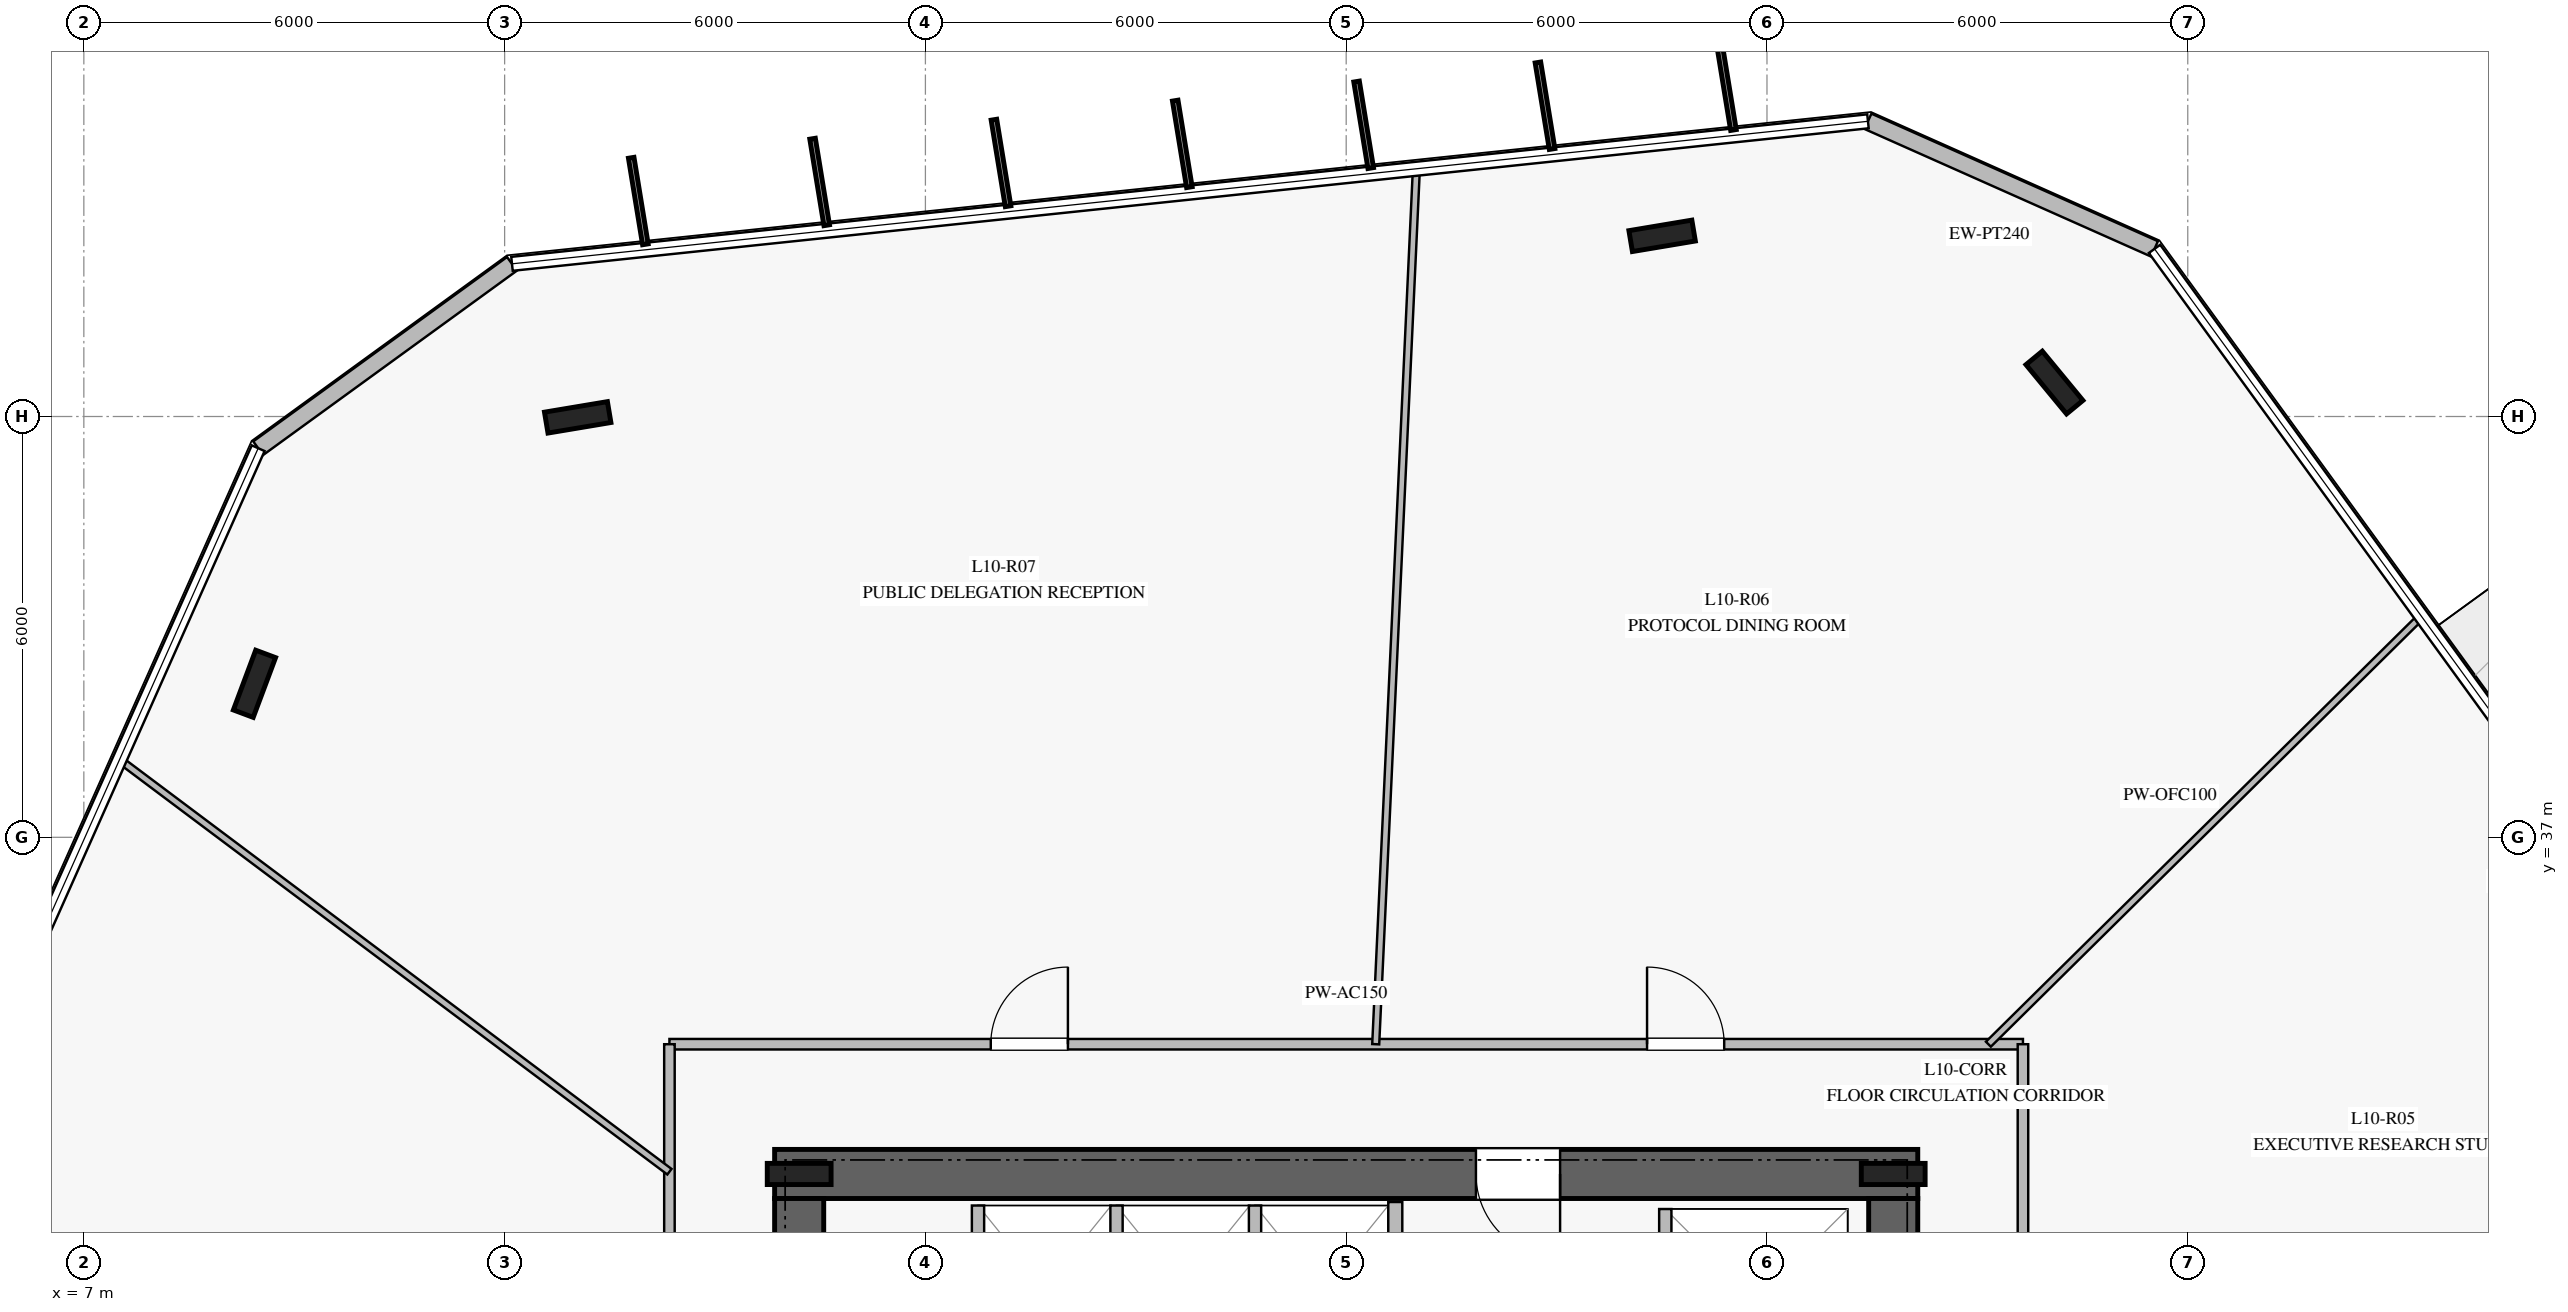
"""IFC4 building model, lengths in metres.
Left out: names, types, materials, properties, quantities, classifications, styles, units other than length and angle.
Written with IfcOpenShell. Run it as: python <this file> out.ifc"""

import sys

from ifc_helpers import new_model, si_unit, direction, frame, frame_2d, origin, origin_2d, place, context, subcontext, project, spatial, rectangle, i_section, extrude, element, fill, save


model = new_model("IFC4")
c1 = context("Model", 3, precision=1e-05, world=origin(), true_north=direction((0.0, 1.0)))
c2 = subcontext(c1, "Body", "Model", "MODEL_VIEW")
j1 = project(units=[si_unit("LENGTHUNIT", "METRE"), si_unit("PLANEANGLEUNIT", "RADIAN")], contexts=[c1])
p1 = place(None, origin())
s1 = spatial("IfcSite", under=j1, at=p1, CompositionType="ELEMENT")
p2 = place(p1, origin())
s2 = spatial("IfcBuilding", under=s1, at=p2, CompositionType="ELEMENT")
p3 = place(p2, frame((0.0, 0.0, 44.0)))
s3 = spatial("IfcBuildingStorey", under=s2, at=p3, CompositionType="ELEMENT", Elevation=44.0)
p4 = place(p3, frame((33.15, 32.2, 0.0), z_axis=(0.0, 0.0, 1.0), x_axis=(-1.0, 0.0, 0.0)))
e1 = element("IfcWall", 1, at=p4, inside=s3, PredefinedType="SHEAR", context=c2, shape_type="SweptSolid", body=[
    extrude(rectangle(XDim=16.3, YDim=0.7, at=frame_2d((8.15, 0.0))), origin(), (0.0, 0.0, 1.0), 3.76),
])
p5 = place(p4, frame((5.1, 0.0, 0.0)))
e2 = element("IfcOpeningElement", 2, at=p5, cuts=e1, PredefinedType="OPENING", context=c2, shape_type="SweptSolid", body=[
    extrude(rectangle(XDim=1.2, YDim=2.25, at=frame_2d((0.6, 1.125))), frame((0.0, 0.36, 0.0), z_axis=(0.0, -1.0, 0.0), x_axis=(1.0, 0.0, 0.0)), (0.0, 0.0, 1.0), 0.72),
])
p6 = place(p3, frame((17.2, 31.85, 0.0), z_axis=(0.0, 0.0, 1.0), x_axis=(0.0, -1.0, 0.0)))
e3 = element("IfcWall", 3, at=p6, inside=s3, PredefinedType="SHEAR", context=c2, shape_type="SweptSolid", body=[
    extrude(rectangle(XDim=13.7, YDim=0.7, at=frame_2d((6.85, 0.0))), origin(), (0.0, 0.0, 1.0), 3.76),
])
p7 = place(p6, frame((2.0, 0.0, 0.0)))
e4 = element("IfcOpeningElement", 4, at=p7, cuts=e3, PredefinedType="OPENING", context=c2, shape_type="SweptSolid", body=[
    extrude(rectangle(XDim=1.5, YDim=2.2, at=frame_2d((0.75, 1.1))), frame((0.0, 0.36, 0.0), z_axis=(0.0, -1.0, 0.0), x_axis=(1.0, 0.0, 0.0)), (0.0, 0.0, 1.0), 0.72),
])
p8 = place(p3, frame((32.8, 18.15, 0.0), z_axis=(0.0, 0.0, 1.0), x_axis=(0.0, 1.0, 0.0)))
e5 = element("IfcWall", 5, at=p8, inside=s3, PredefinedType="SHEAR", context=c2, shape_type="SweptSolid", body=[
    extrude(rectangle(XDim=13.7, YDim=0.7, at=frame_2d((6.85, 0.0))), origin(), (0.0, 0.0, 1.0), 3.76),
])
for number, where, z_axis, x_axis in (
    (6, (32.8, 32.2, 0.0), (0.0, 0.0, 1.0), (1.0, 0.0, 0.0)),
    (7, (17.2, 32.2, 0.0), (0.0, 0.0, 1.0), (1.0, 0.0, 0.0)),
    (8, (35.099, 43.484, 0.0), (0.0, 0.0, 1.0), (-0.636, 0.772, 0.0)),
    (9, (29.505, 45.576, 0.0), (0.0, 0.0, 1.0), (0.986, 0.165, 0.0)),
    (10, (14.042, 42.988, 0.0), (0.0, 0.0, 1.0), (0.986, 0.165, 0.0)),
    (11, (9.433, 39.189, 0.0), (0.0, 0.0, 1.0), (0.35, 0.937, 0.0)),
):
    element("IfcColumn", number, at=place(p3, frame(where, z_axis=z_axis, x_axis=x_axis)), inside=s3, PredefinedType="COLUMN", context=c2, shape_type="SweptSolid", body=[
        extrude(i_section(OverallWidth=0.302, OverallDepth=0.91, WebThickness=0.021, FlangeThickness=0.04, at=origin_2d()), origin(), (0.0, 0.0, 1.0), 4.0),
    ])
p9 = place(p3, frame((36.526, 45.39, 0.0), z_axis=(0.0, 0.0, 1.0), x_axis=(-0.91355250122, 0.406720822573, 0.0)))
e12 = element("IfcWall", 12, at=p9, inside=s3, PredefinedType="STANDARD", context=c2, shape_type="SweptSolid", body=[
    extrude(rectangle(XDim=4.473, YDim=0.24, at=frame_2d((2.236, 0.0))), origin(), (0.0, 0.0, 1.0), 3.76),
])
p10 = place(p3, frame((13.105, 45.177, 0.0), z_axis=(0.0, 0.0, 1.0), x_axis=(-0.80905696026, -0.587730240038, 0.0)))
e13 = element("IfcWall", 13, at=p10, inside=s3, PredefinedType="STANDARD", context=c2, shape_type="SweptSolid", body=[
    extrude(rectangle(XDim=4.473, YDim=0.24, at=frame_2d((2.236, 0.0))), origin(), (0.0, 0.0, 1.0), 3.76),
])
p11 = place(p3, frame((25.7, 26.65, 0.0), z_axis=(0.0, 0.0, 1.0), x_axis=(0.0, 1.0, 0.0)))
e14 = element("IfcWall", 14, at=p11, inside=s3, PredefinedType="PARTITIONING", context=c2, shape_type="SweptSolid", body=[
    extrude(rectangle(XDim=5.15, YDim=0.2, at=frame_2d((2.575, 0.0))), origin(), (0.0, 0.0, 1.0), 3.76),
])
for number, where, z_axis, x_axis in (
    (15, (19.75, 29.4, 0.0), (0.0, 0.0, 1.0), (0.0, 1.0, 0.0)),
    (16, (21.725, 29.4, 0.0), (0.0, 0.0, 1.0), (0.0, 1.0, 0.0)),
    (17, (23.7, 29.4, 0.0), (0.0, 0.0, 1.0), (0.0, 1.0, 0.0)),
):
    element("IfcWall", number, at=place(p3, frame(where, z_axis=z_axis, x_axis=x_axis)), inside=s3, PredefinedType="PARTITIONING", context=c2, shape_type="SweptSolid", body=[
        extrude(rectangle(XDim=2.35, YDim=0.175, at=frame_2d((1.175, 0.0))), origin(), (0.0, 0.0, 1.0), 3.76),
    ])
p12 = place(p3, frame((29.55, 29.1, 0.0), z_axis=(0.0, 0.0, 1.0), x_axis=(0.0, 1.0, 0.0)))
e18 = element("IfcWall", 18, at=p12, inside=s3, PredefinedType="PARTITIONING", context=c2, shape_type="SweptSolid", body=[
    extrude(rectangle(XDim=2.6, YDim=0.175, at=frame_2d((1.3, 0.0))), origin(), (0.0, 0.0, 1.0), 3.76),
])
p13 = place(p12, frame((0.7, 0.0, 0.0)))
e19 = element("IfcOpeningElement", 19, at=p13, cuts=e18, PredefinedType="OPENING", context=c2, shape_type="SweptSolid", body=[
    extrude(rectangle(XDim=1.2, YDim=2.2, at=frame_2d((0.6, 1.1))), frame((0.0, 0.098, 0.0), z_axis=(0.0, -1.0, 0.0), x_axis=(1.0, 0.0, 0.0)), (0.0, 0.0, 1.0), 0.195),
])
p14 = place(p3, frame((15.35, 34.05, 0.0), z_axis=(0.0, 0.0, 1.0), x_axis=(1.0, 0.0, 0.0)))
e20 = element("IfcWall", 20, at=p14, inside=s3, PredefinedType="PARTITIONING", context=c2, shape_type="SweptSolid", body=[
    extrude(rectangle(XDim=19.3, YDim=0.15, at=frame_2d((9.65, 0.0))), origin(), (0.0, 0.0, 1.0), 3.21),
])
p15 = place(p14, frame((13.94, 0.0, 0.0)))
e21 = element("IfcOpeningElement", 21, at=p15, cuts=e20, PredefinedType="OPENING", context=c2, shape_type="SweptSolid", body=[
    extrude(rectangle(XDim=1.1, YDim=2.2, at=frame_2d((0.55, 1.1))), frame((0.0, 0.085, 0.0), z_axis=(0.0, -1.0, 0.0), x_axis=(1.0, 0.0, 0.0)), (0.0, 0.0, 1.0), 0.17),
])
p16 = place(p14, frame((4.582, 0.0, 0.0)))
e22 = element("IfcOpeningElement", 22, at=p16, cuts=e20, PredefinedType="OPENING", context=c2, shape_type="SweptSolid", body=[
    extrude(rectangle(XDim=1.1, YDim=2.2, at=frame_2d((0.55, 1.1))), frame((0.0, 0.085, 0.0), z_axis=(0.0, -1.0, 0.0), x_axis=(1.0, 0.0, 0.0)), (0.0, 0.0, 1.0), 0.17),
])
p17 = place(p3, frame((34.65, 34.05, 0.0), z_axis=(0.0, 0.0, 1.0), x_axis=(0.0, -1.0, 0.0)))
e23 = element("IfcWall", 23, at=p17, inside=s3, PredefinedType="PARTITIONING", context=c2, shape_type="SweptSolid", body=[
    extrude(rectangle(XDim=18.1, YDim=0.15, at=frame_2d((9.05, 0.0))), origin(), (0.0, 0.0, 1.0), 3.21),
])
p18 = place(p17, frame((12.708, 0.0, 0.0)))
e24 = element("IfcOpeningElement", 24, at=p18, cuts=e23, PredefinedType="OPENING", context=c2, shape_type="SweptSolid", body=[
    extrude(rectangle(XDim=1.1, YDim=2.2, at=frame_2d((0.55, 1.1))), frame((0.0, 0.085, 0.0), z_axis=(0.0, -1.0, 0.0), x_axis=(1.0, 0.0, 0.0)), (0.0, 0.0, 1.0), 0.17),
])
p19 = place(p17, frame((4.114, 0.0, 0.0)))
e25 = element("IfcOpeningElement", 25, at=p19, cuts=e23, PredefinedType="OPENING", context=c2, shape_type="SweptSolid", body=[
    extrude(rectangle(XDim=1.1, YDim=2.2, at=frame_2d((0.55, 1.1))), frame((0.0, 0.085, 0.0), z_axis=(0.0, -1.0, 0.0), x_axis=(1.0, 0.0, 0.0)), (0.0, 0.0, 1.0), 0.17),
])
p20 = place(p3, frame((15.35, 15.95, 0.0), z_axis=(0.0, 0.0, 1.0), x_axis=(0.0, 1.0, 0.0)))
e26 = element("IfcWall", 26, at=p20, inside=s3, PredefinedType="PARTITIONING", context=c2, shape_type="SweptSolid", body=[
    extrude(rectangle(XDim=18.1, YDim=0.15, at=frame_2d((9.05, 0.0))), origin(), (0.0, 0.0, 1.0), 3.21),
])
p21 = place(p20, frame((10.07, 0.0, 0.0)))
e27 = element("IfcOpeningElement", 27, at=p21, cuts=e26, PredefinedType="OPENING", context=c2, shape_type="SweptSolid", body=[
    extrude(rectangle(XDim=1.1, YDim=2.2, at=frame_2d((0.55, 1.1))), frame((0.0, 0.085, 0.0), z_axis=(0.0, -1.0, 0.0), x_axis=(1.0, 0.0, 0.0)), (0.0, 0.0, 1.0), 0.17),
])
p22 = place(p3, frame((34.157, 34.05, 0.0), z_axis=(0.0, 0.0, 1.0), x_axis=(0.711265132762, 0.702923830096, 0.0)))
e28 = element("IfcWall", 28, at=p22, inside=s3, PredefinedType="MOVABLE", context=c2, shape_type="SweptSolid", body=[
    extrude(rectangle(XDim=8.664, YDim=0.1, at=frame_2d((4.332, 0.0))), origin(), (0.0, 0.0, 1.0), 3.06),
])
p23 = place(p3, frame((25.421, 34.05, 0.0), z_axis=(0.0, 0.0, 1.0), x_axis=(0.046408732595, 0.998922534303, 0.0)))
e29 = element("IfcWall", 29, at=p23, inside=s3, PredefinedType="MOVABLE", context=c2, shape_type="SweptSolid", body=[
    extrude(rectangle(XDim=12.478, YDim=0.1, at=frame_2d((6.239, 0.0))), origin(), (0.0, 0.0, 1.0), 3.05),
])
p24 = place(p3, frame((15.35, 32.232, 0.0), z_axis=(0.0, 0.0, 1.0), x_axis=(-0.800263515523, 0.599648485134, 0.0)))
e30 = element("IfcWall", 30, at=p24, inside=s3, PredefinedType="MOVABLE", context=c2, shape_type="SweptSolid", body=[
    extrude(rectangle(XDim=9.781, YDim=0.1, at=frame_2d((4.89, 0.0))), origin(), (0.0, 0.0, 1.0), 3.06),
])
p25 = place(p5, origin())
e31 = element("IfcDoor", 31, at=p25, inside=s3, OperationType="SINGLE_SWING_LEFT", PredefinedType="DOOR", context=c2, shape_type="SweptSolid", body=[
    extrude(rectangle(XDim=1.2, YDim=2.25, at=frame_2d((0.6, 1.125))), frame((0.0, 0.025, 0.0), z_axis=(0.0, -1.0, 0.0), x_axis=(1.0, 0.0, 0.0)), (0.0, 0.0, 1.0), 0.05),
])
fill(e2, e31)
p26 = place(p15, origin())
e32 = element("IfcDoor", 32, at=p26, inside=s3, OperationType="SINGLE_SWING_LEFT", PredefinedType="DOOR", context=c2, shape_type="SweptSolid", body=[
    extrude(rectangle(XDim=1.1, YDim=2.2, at=frame_2d((0.55, 1.1))), frame((0.0, 0.025, 0.0), z_axis=(0.0, -1.0, 0.0), x_axis=(1.0, 0.0, 0.0)), (0.0, 0.0, 1.0), 0.05),
])
fill(e21, e32)
p27 = place(p16, origin())
e33 = element("IfcDoor", 33, at=p27, inside=s3, OperationType="SINGLE_SWING_RIGHT", PredefinedType="DOOR", context=c2, shape_type="SweptSolid", body=[
    extrude(rectangle(XDim=1.1, YDim=2.2, at=frame_2d((0.55, 1.1))), frame((0.0, 0.025, 0.0), z_axis=(0.0, -1.0, 0.0), x_axis=(1.0, 0.0, 0.0)), (0.0, 0.0, 1.0), 0.05),
])
fill(e22, e33)
save(model, sys.argv[1])
